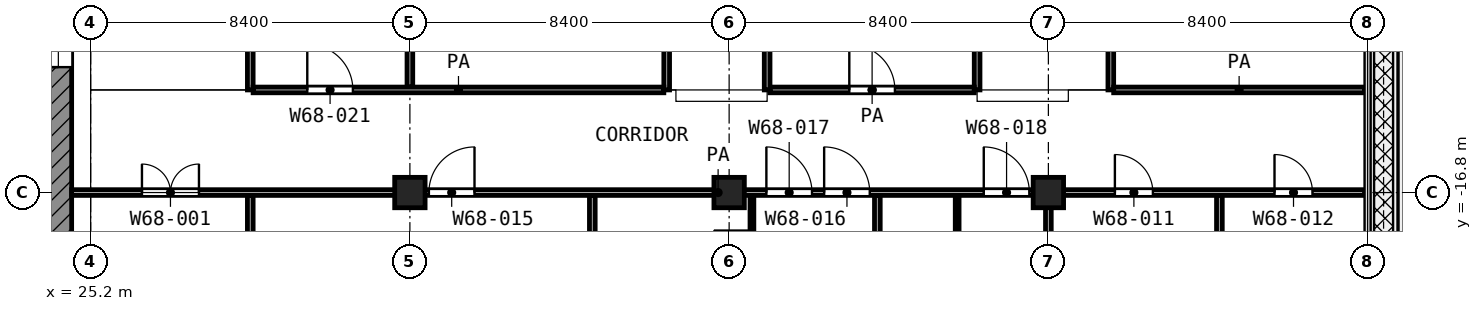
"""IFC4 building model, lengths in metres.
Left out: names, types, materials, properties, quantities, classifications, styles, units other than length and angle.
Written with IfcOpenShell. Run it as: python <this file> out.ifc"""

import sys

from ifc_helpers import new_model, si_unit, direction, frame, frame_2d, origin, origin_2d, place, context, subcontext, project, spatial, rectangle, extrude, element, fill, save


model = new_model("IFC4")
c1 = context("Model", 3, precision=1e-05, world=origin(), true_north=direction((0.0, 1.0)))
c2 = subcontext(c1, "Body", "Model", "MODEL_VIEW")
j1 = project(units=[si_unit("LENGTHUNIT", "METRE"), si_unit("PLANEANGLEUNIT", "RADIAN")], contexts=[c1])
p1 = place(None, origin())
s1 = spatial("IfcSite", under=j1, at=p1, CompositionType="ELEMENT")
p2 = place(p1, origin())
s2 = spatial("IfcBuilding", under=s1, at=p2, CompositionType="ELEMENT")
p3 = place(p2, frame((0.0, 0.0, 315.4)))
s3 = spatial("IfcBuildingStorey", under=s2, at=p3, CompositionType="ELEMENT", Elevation=315.4)
for number, where, z_axis, x_axis in (
    (1, (33.6, -16.8, 0.0), (0.0, 0.0, 1.0), (1.0, 0.0, 0.0)),
    (2, (42.0, -16.8, 0.0), (0.0, 0.0, 1.0), (1.0, 0.0, 0.0)),
    (3, (50.4, -16.8, 0.0), (0.0, 0.0, 1.0), (1.0, 0.0, 0.0)),
):
    element("IfcColumn", number, at=place(p3, frame(where, z_axis=z_axis, x_axis=x_axis)), inside=s3, PredefinedType="COLUMN", context=c2, shape_type="SweptSolid", body=[
        extrude(rectangle(XDim=0.8, YDim=0.8, at=origin_2d()), origin(), (0.0, 0.0, 1.0), 4.2),
    ])
p4 = place(p3, frame((24.35, -24.0, 0.0), z_axis=(0.0, 0.0, 1.0), x_axis=(0.0, 1.0, 0.0)))
e4 = element("IfcWall", 4, at=p4, inside=s3, PredefinedType="SHEAR", context=c2, shape_type="SweptSolid", body=[
    extrude(rectangle(XDim=18.6, YDim=0.7, at=frame_2d((9.3, 0.0))), origin(), (0.0, 0.0, 1.0), 3.6),
])
p5 = place(p4, frame((10.5, 0.0, 0.0)))
e5 = element("IfcOpeningElement", 5, at=p5, cuts=e4, PredefinedType="OPENING", context=c2, shape_type="SweptSolid", body=[
    extrude(rectangle(XDim=1.8, YDim=2.1, at=frame_2d((0.9, 1.05))), frame((0.0, 0.36, 0.0), z_axis=(0.0, -1.0, 0.0), x_axis=(1.0, 0.0, 0.0)), (0.0, 0.0, 1.0), 0.72),
])
p6 = place(p3, frame((42.6, -19.75, 0.0), z_axis=(0.0, 0.0, 1.0), x_axis=(0.0, 1.0, 0.0)))
e6 = element("IfcWall", 6, at=p6, inside=s3, PredefinedType="PARTITIONING", context=c2, shape_type="SweptSolid", body=[
    extrude(rectangle(XDim=2.875, YDim=0.1, at=frame_2d((1.438, 0.0))), origin(), (0.0, 0.0, 1.0), 3.6),
])
p7 = place(p6, frame((0.95, 0.0, 0.0)))
e7 = element("IfcOpeningElement", 7, at=p7, cuts=e6, PredefinedType="OPENING", context=c2, shape_type="SweptSolid", body=[
    extrude(rectangle(XDim=1.0, YDim=2.1, at=frame_2d((0.5, 1.05))), frame((0.0, 0.06, 0.0), z_axis=(0.0, -1.0, 0.0), x_axis=(1.0, 0.0, 0.0)), (0.0, 0.0, 1.0), 0.12),
])
p8 = place(p3, frame((48.0, -20.1, 0.0), z_axis=(0.0, 0.0, 1.0), x_axis=(0.0, 1.0, 0.0)))
e8 = element("IfcWall", 8, at=p8, inside=s3, PredefinedType="PARTITIONING", context=c2, shape_type="SweptSolid", body=[
    extrude(rectangle(XDim=3.225, YDim=0.1, at=frame_2d((1.613, 0.0))), origin(), (0.0, 0.0, 1.0), 3.6),
])
p9 = place(p3, frame((24.7, -16.8, 0.0), z_axis=(0.0, 0.0, 1.0), x_axis=(1.0, 0.0, 0.0)))
e9 = element("IfcWall", 9, at=p9, inside=s3, PredefinedType="PARTITIONING", context=c2, shape_type="SweptSolid", body=[
    extrude(rectangle(XDim=34.02, YDim=0.15, at=frame_2d((17.01, 0.0))), origin(), (0.0, 0.0, 1.0), 3.6),
])
p10 = place(p9, frame((1.85, 0.0, 0.0)))
e10 = element("IfcOpeningElement", 10, at=p10, cuts=e9, PredefinedType="OPENING", context=c2, shape_type="SweptSolid", body=[
    extrude(rectangle(XDim=1.5, YDim=2.1, at=frame_2d((0.75, 1.05))), frame((0.0, 0.085, 0.0), z_axis=(0.0, -1.0, 0.0), x_axis=(1.0, 0.0, 0.0)), (0.0, 0.0, 1.0), 0.17),
])
p11 = place(p9, frame((9.4, 0.0, 0.0)))
e11 = element("IfcOpeningElement", 11, at=p11, cuts=e9, PredefinedType="OPENING", context=c2, shape_type="SweptSolid", body=[
    extrude(rectangle(XDim=1.2, YDim=2.1, at=frame_2d((0.6, 1.05))), frame((0.0, 0.085, 0.0), z_axis=(0.0, -1.0, 0.0), x_axis=(1.0, 0.0, 0.0)), (0.0, 0.0, 1.0), 0.17),
])
p12 = place(p9, frame((19.8, 0.0, 0.0)))
e12 = element("IfcOpeningElement", 12, at=p12, cuts=e9, PredefinedType="OPENING", context=c2, shape_type="SweptSolid", body=[
    extrude(rectangle(XDim=1.2, YDim=2.1, at=frame_2d((0.6, 1.05))), frame((0.0, 0.085, 0.0), z_axis=(0.0, -1.0, 0.0), x_axis=(1.0, 0.0, 0.0)), (0.0, 0.0, 1.0), 0.17),
])
p13 = place(p9, frame((18.28, 0.0, 0.0)))
e13 = element("IfcOpeningElement", 13, at=p13, cuts=e9, PredefinedType="OPENING", context=c2, shape_type="SweptSolid", body=[
    extrude(rectangle(XDim=1.2, YDim=2.1, at=frame_2d((0.6, 1.05))), frame((0.0, 0.085, 0.0), z_axis=(0.0, -1.0, 0.0), x_axis=(1.0, 0.0, 0.0)), (0.0, 0.0, 1.0), 0.17),
])
p14 = place(p9, frame((24.0, 0.0, 0.0)))
e14 = element("IfcOpeningElement", 14, at=p14, cuts=e9, PredefinedType="OPENING", context=c2, shape_type="SweptSolid", body=[
    extrude(rectangle(XDim=1.2, YDim=2.1, at=frame_2d((0.6, 1.05))), frame((0.0, 0.085, 0.0), z_axis=(0.0, -1.0, 0.0), x_axis=(1.0, 0.0, 0.0)), (0.0, 0.0, 1.0), 0.17),
])
p15 = place(p9, frame((27.45, 0.0, 0.0)))
e15 = element("IfcOpeningElement", 15, at=p15, cuts=e9, PredefinedType="OPENING", context=c2, shape_type="SweptSolid", body=[
    extrude(rectangle(XDim=1.0, YDim=2.1, at=frame_2d((0.5, 1.05))), frame((0.0, 0.085, 0.0), z_axis=(0.0, -1.0, 0.0), x_axis=(1.0, 0.0, 0.0)), (0.0, 0.0, 1.0), 0.17),
])
p16 = place(p9, frame((31.65, 0.0, 0.0)))
e16 = element("IfcOpeningElement", 16, at=p16, cuts=e9, PredefinedType="OPENING", context=c2, shape_type="SweptSolid", body=[
    extrude(rectangle(XDim=1.0, YDim=2.1, at=frame_2d((0.5, 1.05))), frame((0.0, 0.085, 0.0), z_axis=(0.0, -1.0, 0.0), x_axis=(1.0, 0.0, 0.0)), (0.0, 0.0, 1.0), 0.17),
])
p17 = place(p3, frame((29.475, -14.1, 0.0), z_axis=(0.0, 0.0, 1.0), x_axis=(1.0, 0.0, 0.0)))
e17 = element("IfcWall", 17, at=p17, inside=s3, PredefinedType="PARTITIONING", context=c2, shape_type="SweptSolid", body=[
    extrude(rectangle(XDim=10.807, YDim=0.15, at=frame_2d((5.403, 0.0))), origin(), (0.0, 0.0, 1.0), 3.6),
])
p18 = place(p17, frame((1.425, 0.0, 0.0)))
e18 = element("IfcOpeningElement", 18, at=p18, cuts=e17, PredefinedType="OPENING", context=c2, shape_type="SweptSolid", body=[
    extrude(rectangle(XDim=1.2, YDim=2.1, at=frame_2d((0.6, 1.05))), frame((0.0, 0.085, 0.0), z_axis=(0.0, -1.0, 0.0), x_axis=(1.0, 0.0, 0.0)), (0.0, 0.0, 1.0), 0.17),
])
p19 = place(p3, frame((43.075, -14.1, 0.0), z_axis=(0.0, 0.0, 1.0), x_axis=(1.0, 0.0, 0.0)))
e19 = element("IfcWall", 19, at=p19, inside=s3, PredefinedType="PARTITIONING", context=c2, shape_type="SweptSolid", body=[
    extrude(rectangle(XDim=5.375, YDim=0.15, at=frame_2d((2.688, 0.0))), origin(), (0.0, 0.0, 1.0), 3.6),
])
p20 = place(p19, frame((2.087, 0.0, 0.0)))
e20 = element("IfcOpeningElement", 20, at=p20, cuts=e19, PredefinedType="OPENING", context=c2, shape_type="SweptSolid", body=[
    extrude(rectangle(XDim=1.2, YDim=2.1, at=frame_2d((0.6, 1.05))), frame((0.0, 0.085, 0.0), z_axis=(0.0, -1.0, 0.0), x_axis=(1.0, 0.0, 0.0)), (0.0, 0.0, 1.0), 0.17),
])
p21 = place(p3, frame((52.118, -14.1, 0.0), z_axis=(0.0, 0.0, 1.0), x_axis=(1.0, 0.0, 0.0)))
e21 = element("IfcWall", 21, at=p21, inside=s3, PredefinedType="PARTITIONING", context=c2, shape_type="SweptSolid", body=[
    extrude(rectangle(XDim=6.602, YDim=0.15, at=frame_2d((3.301, 0.0))), origin(), (0.0, 0.0, 1.0), 3.6),
])
p22 = place(p3, frame((29.4, -31.198, 0.0), z_axis=(0.0, 0.0, 1.0), x_axis=(0.0, 1.0, 0.0)))
e22 = element("IfcWall", 22, at=p22, inside=s3, PredefinedType="PARTITIONING", context=c2, shape_type="SweptSolid", body=[
    extrude(rectangle(XDim=14.323, YDim=0.15, at=frame_2d((7.162, 0.0))), origin(), (0.0, 0.0, 1.0), 3.6),
])
p23 = place(p3, frame((29.4, -14.1, 0.0), z_axis=(0.0, 0.0, 1.0), x_axis=(0.0, 1.0, 0.0)))
e23 = element("IfcWall", 23, at=p23, inside=s3, PredefinedType="PARTITIONING", context=c2, shape_type="SweptSolid", body=[
    extrude(rectangle(XDim=14.02, YDim=0.15, at=frame_2d((7.01, 0.0))), origin(), (0.0, 0.0, 1.0), 3.6),
])
p24 = place(p3, frame((33.6, -14.025, 0.0), z_axis=(0.0, 0.0, 1.0), x_axis=(0.0, 1.0, 0.0)))
e24 = element("IfcWall", 24, at=p24, inside=s3, PredefinedType="PARTITIONING", context=c2, shape_type="SweptSolid", body=[
    extrude(rectangle(XDim=13.945, YDim=0.15, at=frame_2d((6.972, 0.0))), origin(), (0.0, 0.0, 1.0), 3.6),
])
p25 = place(p3, frame((38.4, -25.12, 0.0), z_axis=(0.0, 0.0, 1.0), x_axis=(0.0, 1.0, 0.0)))
e25 = element("IfcWall", 25, at=p25, inside=s3, PredefinedType="PARTITIONING", context=c2, shape_type="SweptSolid", body=[
    extrude(rectangle(XDim=8.245, YDim=0.15, at=frame_2d((4.123, 0.0))), origin(), (0.0, 0.0, 1.0), 3.6),
])
p26 = place(p3, frame((40.357, -14.1, 0.0), z_axis=(0.0, 0.0, 1.0), x_axis=(0.0, 1.0, 0.0)))
e26 = element("IfcWall", 26, at=p26, inside=s3, PredefinedType="PARTITIONING", context=c2, shape_type="SweptSolid", body=[
    extrude(rectangle(XDim=14.02, YDim=0.15, at=frame_2d((7.01, 0.0))), origin(), (0.0, 0.0, 1.0), 3.6),
])
p27 = place(p26, frame((6.375, 0.0, 0.0)))
e27 = element("IfcOpeningElement", 27, at=p27, cuts=e26, PredefinedType="OPENING", context=c2, shape_type="SweptSolid", body=[
    extrude(rectangle(XDim=1.0, YDim=2.1, at=frame_2d((0.5, 1.05))), frame((0.0, 0.085, 0.0), z_axis=(0.0, -1.0, 0.0), x_axis=(1.0, 0.0, 0.0)), (0.0, 0.0, 1.0), 0.17),
])
p28 = place(p3, frame((43.0, -14.1, 0.0), z_axis=(0.0, 0.0, 1.0), x_axis=(0.0, 1.0, 0.0)))
e28 = element("IfcWall", 28, at=p28, inside=s3, PredefinedType="PARTITIONING", context=c2, shape_type="SweptSolid", body=[
    extrude(rectangle(XDim=5.298, YDim=0.15, at=frame_2d((2.649, 0.0))), origin(), (0.0, 0.0, 1.0), 3.6),
])
p29 = place(p3, frame((45.9, -25.12, 0.0), z_axis=(0.0, 0.0, 1.0), x_axis=(0.0, 1.0, 0.0)))
e29 = element("IfcWall", 29, at=p29, inside=s3, PredefinedType="PARTITIONING", context=c2, shape_type="SweptSolid", body=[
    extrude(rectangle(XDim=8.245, YDim=0.15, at=frame_2d((4.123, 0.0))), origin(), (0.0, 0.0, 1.0), 3.6),
])
p30 = place(p3, frame((48.525, -14.1, 0.0), z_axis=(0.0, 0.0, 1.0), x_axis=(0.0, 1.0, 0.0)))
e30 = element("IfcWall", 30, at=p30, inside=s3, PredefinedType="PARTITIONING", context=c2, shape_type="SweptSolid", body=[
    extrude(rectangle(XDim=5.45, YDim=0.15, at=frame_2d((2.725, 0.0))), origin(), (0.0, 0.0, 1.0), 3.6),
])
p31 = place(p3, frame((50.4, -25.12, 0.0), z_axis=(0.0, 0.0, 1.0), x_axis=(0.0, 1.0, 0.0)))
e31 = element("IfcWall", 31, at=p31, inside=s3, PredefinedType="PARTITIONING", context=c2, shape_type="SweptSolid", body=[
    extrude(rectangle(XDim=8.245, YDim=0.15, at=frame_2d((4.123, 0.0))), origin(), (0.0, 0.0, 1.0), 3.6),
])
p32 = place(p3, frame((52.043, -14.1, 0.0), z_axis=(0.0, 0.0, 1.0), x_axis=(0.0, 1.0, 0.0)))
e32 = element("IfcWall", 32, at=p32, inside=s3, PredefinedType="PARTITIONING", context=c2, shape_type="SweptSolid", body=[
    extrude(rectangle(XDim=12.248, YDim=0.15, at=frame_2d((6.124, 0.0))), origin(), (0.0, 0.0, 1.0), 3.6),
])
p33 = place(p32, frame((6.074, 0.0, 0.0)))
e33 = element("IfcOpeningElement", 33, at=p33, cuts=e32, PredefinedType="OPENING", context=c2, shape_type="SweptSolid", body=[
    extrude(rectangle(XDim=1.5, YDim=2.1, at=frame_2d((0.75, 1.05))), frame((0.0, 0.085, 0.0), z_axis=(0.0, -1.0, 0.0), x_axis=(1.0, 0.0, 0.0)), (0.0, 0.0, 1.0), 0.17),
])
p34 = place(p3, frame((54.9, -22.987, 0.0), z_axis=(0.0, 0.0, 1.0), x_axis=(0.0, 1.0, 0.0)))
e34 = element("IfcWall", 34, at=p34, inside=s3, PredefinedType="PARTITIONING", context=c2, shape_type="SweptSolid", body=[
    extrude(rectangle(XDim=6.112, YDim=0.15, at=frame_2d((3.056, 0.0))), origin(), (0.0, 0.0, 1.0), 3.6),
])
p35 = place(p5, origin())
e35 = element("IfcDoor", 35, at=p35, inside=s3, OperationType="DOUBLE_DOOR_SINGLE_SWING", PredefinedType="DOOR", context=c2, shape_type="SweptSolid", body=[
    extrude(rectangle(XDim=1.8, YDim=2.1, at=frame_2d((0.9, 1.05))), frame((0.0, 0.025, 0.0), z_axis=(0.0, -1.0, 0.0), x_axis=(1.0, 0.0, 0.0)), (0.0, 0.0, 1.0), 0.05),
])
fill(e5, e35)
p36 = place(p10, origin())
e36 = element("IfcDoor", 36, at=p36, inside=s3, OperationType="DOUBLE_DOOR_SINGLE_SWING", PredefinedType="DOOR", context=c2, shape_type="SweptSolid", body=[
    extrude(rectangle(XDim=1.5, YDim=2.1, at=frame_2d((0.75, 1.05))), frame((0.0, 0.025, 0.0), z_axis=(0.0, -1.0, 0.0), x_axis=(1.0, 0.0, 0.0)), (0.0, 0.0, 1.0), 0.05),
])
fill(e10, e36)
p37 = place(p20, origin())
e37 = element("IfcDoor", 37, at=p37, inside=s3, OperationType="SINGLE_SWING_LEFT", PredefinedType="DOOR", context=c2, shape_type="SweptSolid", body=[
    extrude(rectangle(XDim=1.2, YDim=2.1, at=frame_2d((0.6, 1.05))), frame((0.0, 0.025, 0.0), z_axis=(0.0, -1.0, 0.0), x_axis=(1.0, 0.0, 0.0)), (0.0, 0.0, 1.0), 0.05),
])
fill(e20, e37)
p38 = place(p11, origin())
e38 = element("IfcDoor", 38, at=p38, inside=s3, OperationType="SINGLE_SWING_RIGHT", PredefinedType="DOOR", context=c2, shape_type="SweptSolid", body=[
    extrude(rectangle(XDim=1.2, YDim=2.1, at=frame_2d((0.6, 1.05))), frame((0.0, 0.025, 0.0), z_axis=(0.0, -1.0, 0.0), x_axis=(1.0, 0.0, 0.0)), (0.0, 0.0, 1.0), 0.05),
])
fill(e11, e38)
p39 = place(p12, origin())
e39 = element("IfcDoor", 39, at=p39, inside=s3, OperationType="SINGLE_SWING_LEFT", PredefinedType="DOOR", context=c2, shape_type="SweptSolid", body=[
    extrude(rectangle(XDim=1.2, YDim=2.1, at=frame_2d((0.6, 1.05))), frame((0.0, 0.025, 0.0), z_axis=(0.0, -1.0, 0.0), x_axis=(1.0, 0.0, 0.0)), (0.0, 0.0, 1.0), 0.05),
])
fill(e12, e39)
p40 = place(p13, origin())
e40 = element("IfcDoor", 40, at=p40, inside=s3, OperationType="SINGLE_SWING_LEFT", PredefinedType="DOOR", context=c2, shape_type="SweptSolid", body=[
    extrude(rectangle(XDim=1.2, YDim=2.1, at=frame_2d((0.6, 1.05))), frame((0.0, 0.025, 0.0), z_axis=(0.0, -1.0, 0.0), x_axis=(1.0, 0.0, 0.0)), (0.0, 0.0, 1.0), 0.05),
])
fill(e13, e40)
p41 = place(p14, origin())
e41 = element("IfcDoor", 41, at=p41, inside=s3, OperationType="SINGLE_SWING_LEFT", PredefinedType="DOOR", context=c2, shape_type="SweptSolid", body=[
    extrude(rectangle(XDim=1.2, YDim=2.1, at=frame_2d((0.6, 1.05))), frame((0.0, 0.025, 0.0), z_axis=(0.0, -1.0, 0.0), x_axis=(1.0, 0.0, 0.0)), (0.0, 0.0, 1.0), 0.05),
])
fill(e14, e41)
p42 = place(p15, origin())
e42 = element("IfcDoor", 42, at=p42, inside=s3, OperationType="SINGLE_SWING_LEFT", PredefinedType="DOOR", context=c2, shape_type="SweptSolid", body=[
    extrude(rectangle(XDim=1.0, YDim=2.1, at=frame_2d((0.5, 1.05))), frame((0.0, 0.025, 0.0), z_axis=(0.0, -1.0, 0.0), x_axis=(1.0, 0.0, 0.0)), (0.0, 0.0, 1.0), 0.05),
])
fill(e15, e42)
p43 = place(p16, origin())
e43 = element("IfcDoor", 43, at=p43, inside=s3, OperationType="SINGLE_SWING_LEFT", PredefinedType="DOOR", context=c2, shape_type="SweptSolid", body=[
    extrude(rectangle(XDim=1.0, YDim=2.1, at=frame_2d((0.5, 1.05))), frame((0.0, 0.025, 0.0), z_axis=(0.0, -1.0, 0.0), x_axis=(1.0, 0.0, 0.0)), (0.0, 0.0, 1.0), 0.05),
])
fill(e16, e43)
p44 = place(p18, origin())
e44 = element("IfcDoor", 44, at=p44, inside=s3, OperationType="SINGLE_SWING_LEFT", PredefinedType="DOOR", context=c2, shape_type="SweptSolid", body=[
    extrude(rectangle(XDim=1.2, YDim=2.1, at=frame_2d((0.6, 1.05))), frame((0.0, 0.025, 0.0), z_axis=(0.0, -1.0, 0.0), x_axis=(1.0, 0.0, 0.0)), (0.0, 0.0, 1.0), 0.05),
])
fill(e18, e44)
save(model, sys.argv[1])
